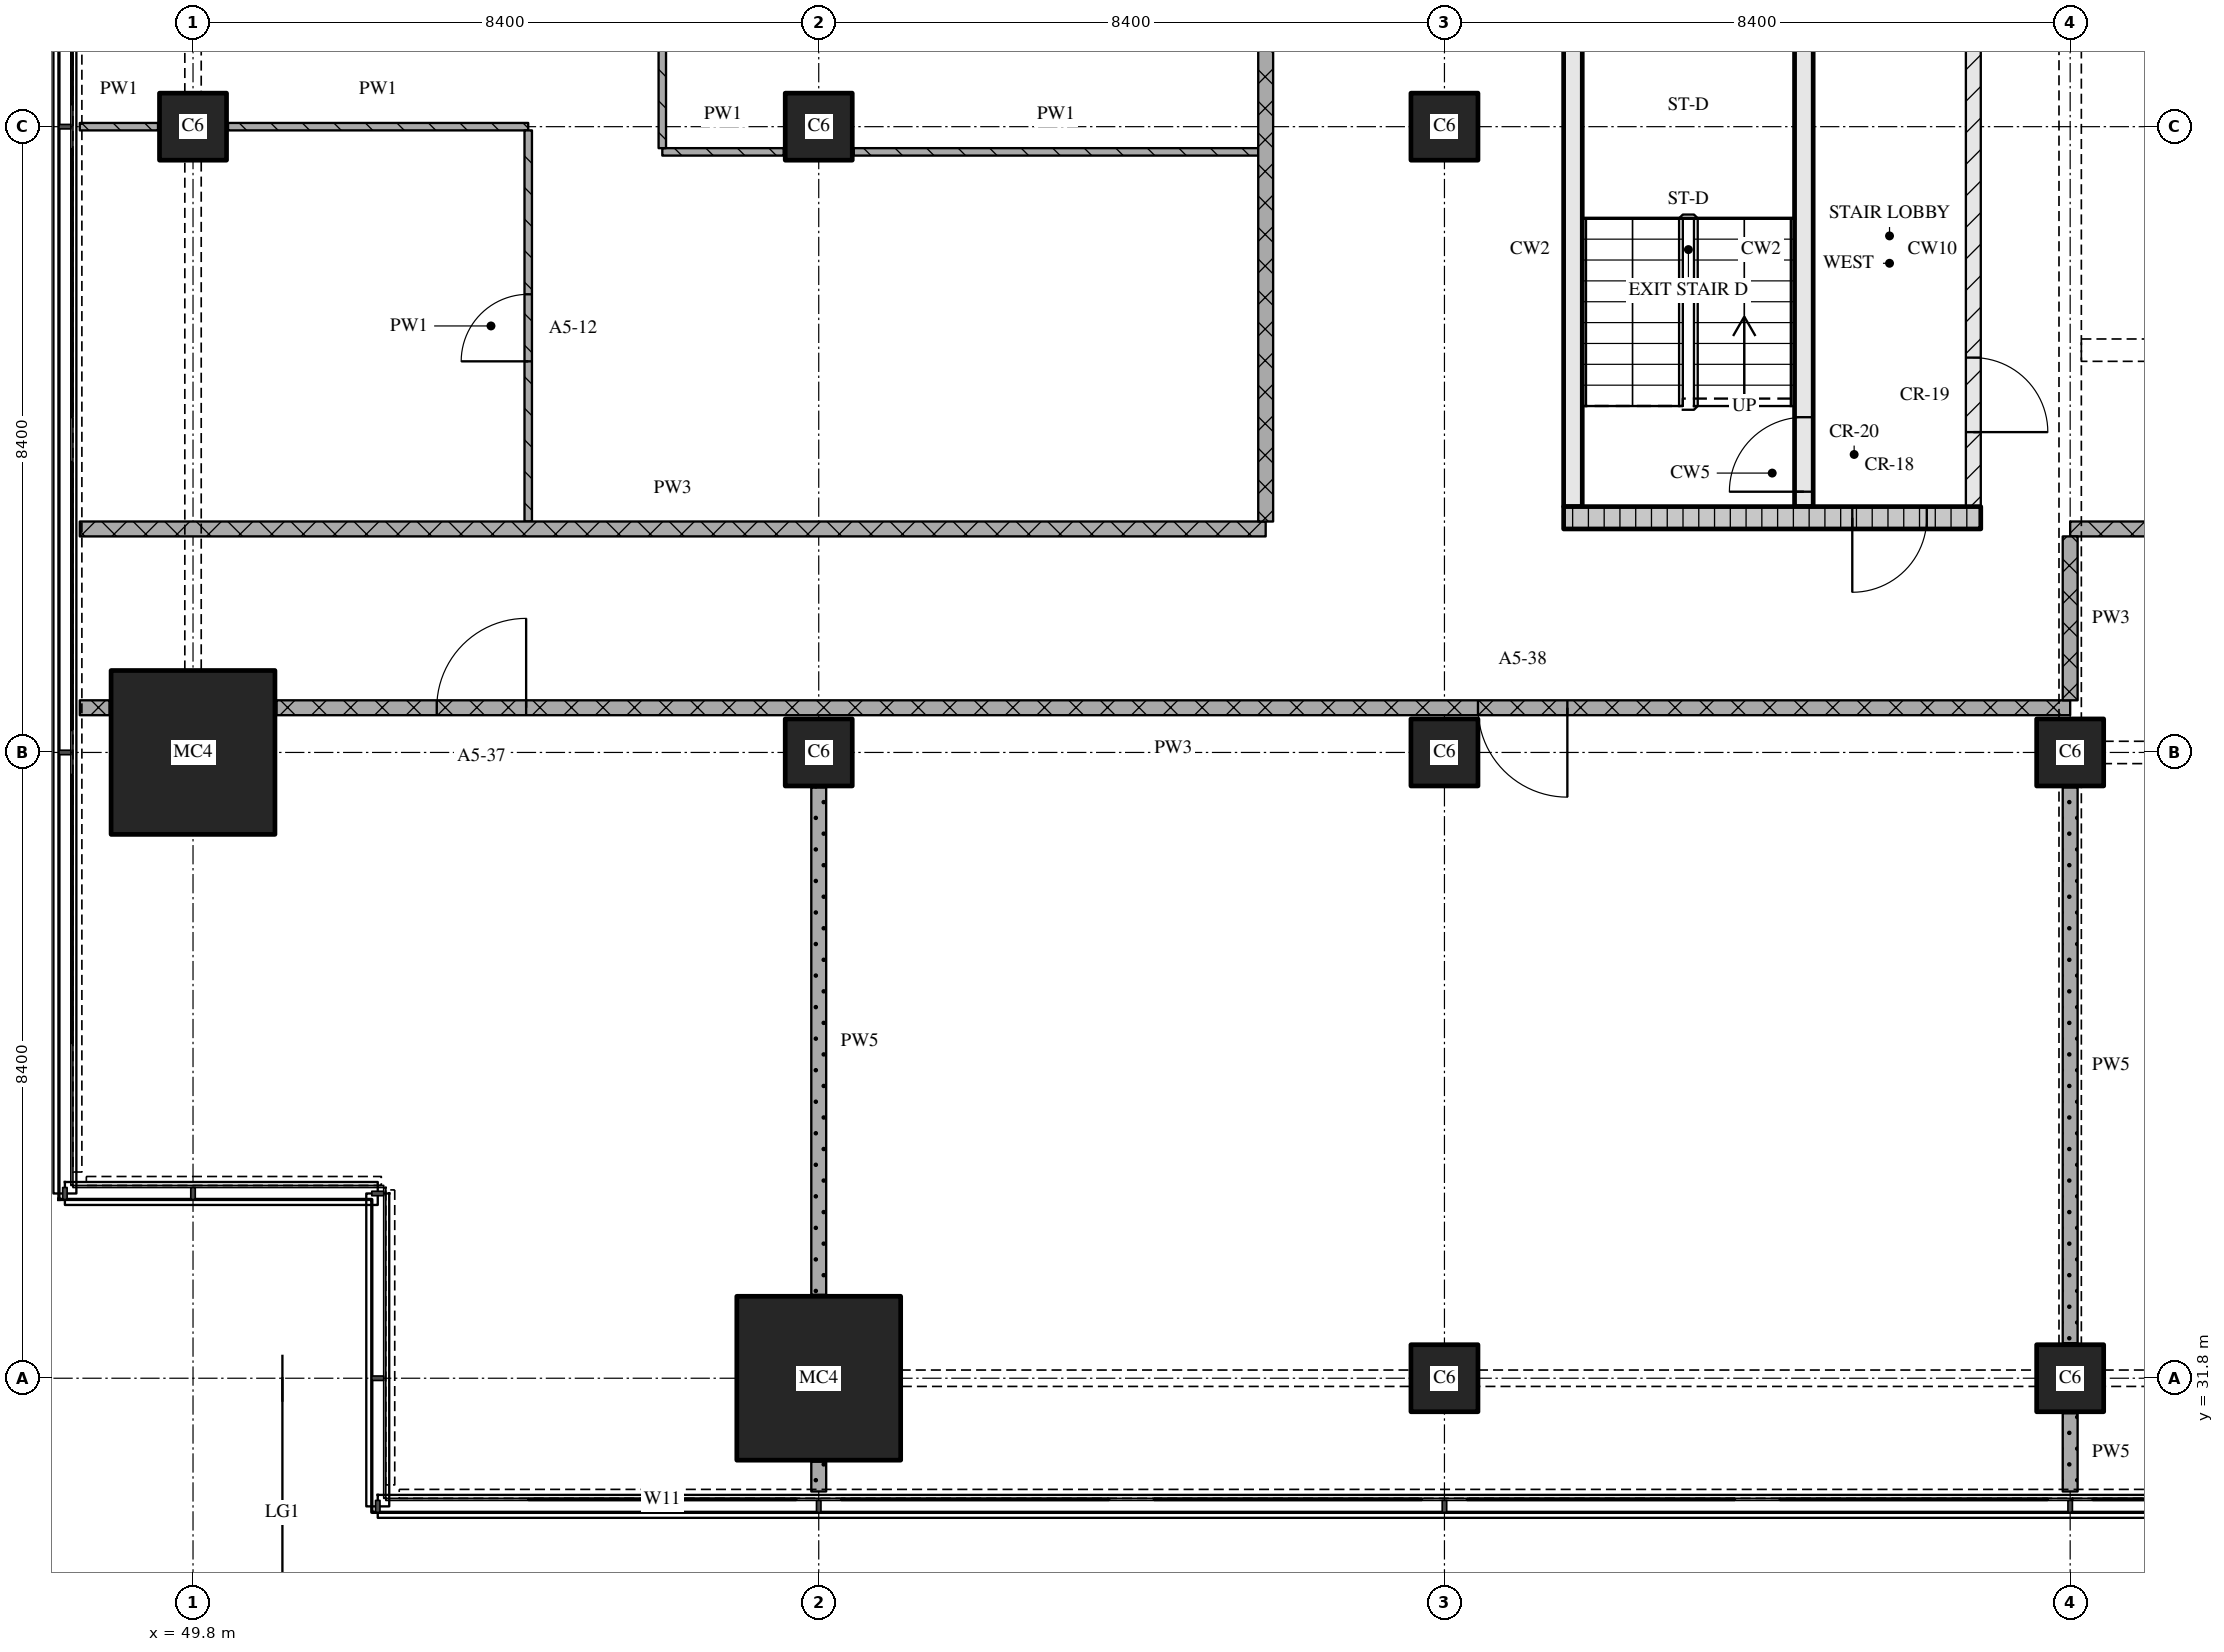
"""IFC4 building model, lengths in metres.
Left out: names, types, materials, properties, quantities, classifications, styles, units other than length and angle.
Written with IfcOpenShell. Run it as: python <this file> out.ifc"""

import sys

from ifc_helpers import new_model, si_unit, direction, frame, frame_2d, origin, origin_2d, place, context, subcontext, project, spatial, rectangle, extrude, element, fill, save


model = new_model("IFC4")
c1 = context("Model", 3, precision=1e-05, world=origin(), true_north=direction((0.0, 1.0)))
c2 = subcontext(c1, "Body", "Model", "MODEL_VIEW")
j1 = project(units=[si_unit("LENGTHUNIT", "METRE"), si_unit("PLANEANGLEUNIT", "RADIAN")], contexts=[c1])
p1 = place(None, origin())
s1 = spatial("IfcSite", under=j1, at=p1, CompositionType="ELEMENT")
p2 = place(p1, origin())
s2 = spatial("IfcBuilding", under=s1, at=p2, CompositionType="ELEMENT")
p3 = place(p2, frame((0.0, 0.0, 80.4)))
s3 = spatial("IfcBuildingStorey", under=s2, at=p3, CompositionType="ELEMENT", Elevation=80.4)
p4 = place(p3, frame((49.8, 40.2, 0.0), z_axis=(0.0, 0.0, 1.0), x_axis=(1.0, 0.0, 0.0)))
e1 = element("IfcColumn", 1, at=p4, inside=s3, PredefinedType="COLUMN", context=c2, shape_type="SweptSolid", body=[
    extrude(rectangle(XDim=2.2, YDim=2.2, at=origin_2d()), origin(), (0.0, 0.0, 1.0), 3.6),
])
p5 = place(p3, frame((49.8, 48.6, 0.0), z_axis=(0.0, 0.0, 1.0), x_axis=(1.0, 0.0, 0.0)))
e2 = element("IfcColumn", 2, at=p5, inside=s3, PredefinedType="COLUMN", context=c2, shape_type="SweptSolid", body=[
    extrude(rectangle(XDim=0.9, YDim=0.9, at=origin_2d()), origin(), (0.0, 0.0, 1.0), 3.6),
])
p6 = place(p3, frame((58.2, 31.8, 0.0), z_axis=(0.0, 0.0, 1.0), x_axis=(1.0, 0.0, 0.0)))
e3 = element("IfcColumn", 3, at=p6, inside=s3, PredefinedType="COLUMN", context=c2, shape_type="SweptSolid", body=[
    extrude(rectangle(XDim=2.2, YDim=2.2, at=origin_2d()), origin(), (0.0, 0.0, 1.0), 3.6),
])
for number, where, z_axis, x_axis in (
    (4, (58.2, 40.2, 0.0), (0.0, 0.0, 1.0), (1.0, 0.0, 0.0)),
    (5, (58.2, 48.6, 0.0), (0.0, 0.0, 1.0), (1.0, 0.0, 0.0)),
    (6, (66.6, 31.8, 0.0), (0.0, 0.0, 1.0), (1.0, 0.0, 0.0)),
    (7, (66.6, 40.2, 0.0), (0.0, 0.0, 1.0), (1.0, 0.0, 0.0)),
    (8, (66.6, 48.6, 0.0), (0.0, 0.0, 1.0), (1.0, 0.0, 0.0)),
    (9, (75.0, 31.8, 0.0), (0.0, 0.0, 1.0), (1.0, 0.0, 0.0)),
    (10, (75.0, 40.2, 0.0), (0.0, 0.0, 1.0), (1.0, 0.0, 0.0)),
):
    element("IfcColumn", number, at=place(p3, frame(where, z_axis=z_axis, x_axis=x_axis)), inside=s3, PredefinedType="COLUMN", context=c2, shape_type="SweptSolid", body=[
        extrude(rectangle(XDim=0.9, YDim=0.9, at=origin_2d()), origin(), (0.0, 0.0, 1.0), 3.6),
    ])
p7 = place(p3, frame((68.2, 43.35, 0.0), z_axis=(0.0, 0.0, 1.0), x_axis=(1.0, 0.0, 0.0)))
e11 = element("IfcWall", 11, at=p7, inside=s3, PredefinedType="SOLIDWALL", context=c2, shape_type="SweptSolid", body=[
    extrude(rectangle(XDim=5.6, YDim=0.3, at=frame_2d((2.8, 0.0))), origin(), (0.0, 0.0, 1.0), 3.3),
])
p8 = place(p7, frame((3.875, 0.0, 0.0)))
e12 = element("IfcOpeningElement", 12, at=p8, cuts=e11, PredefinedType="OPENING", context=c2, shape_type="SweptSolid", body=[
    extrude(rectangle(XDim=1.0, YDim=2.1, at=frame_2d((0.5, 1.05))), frame((0.0, 0.16, 0.0), z_axis=(0.0, -1.0, 0.0), x_axis=(1.0, 0.0, 0.0)), (0.0, 0.0, 1.0), 0.32),
])
p9 = place(p3, frame((68.325, 43.5, 0.0), z_axis=(0.0, 0.0, 1.0), x_axis=(0.0, 1.0, 0.0)))
e13 = element("IfcWall", 13, at=p9, inside=s3, PredefinedType="SOLIDWALL", context=c2, shape_type="SweptSolid", body=[
    extrude(rectangle(XDim=6.9, YDim=0.25, at=frame_2d((3.45, 0.0))), origin(), (0.0, 0.0, 1.0), 3.3),
])
p10 = place(p3, frame((71.425, 43.5, 0.0), z_axis=(0.0, 0.0, 1.0), x_axis=(0.0, 1.0, 0.0)))
e14 = element("IfcWall", 14, at=p10, inside=s3, PredefinedType="SOLIDWALL", context=c2, shape_type="SweptSolid", body=[
    extrude(rectangle(XDim=6.9, YDim=0.25, at=frame_2d((3.45, 0.0))), origin(), (0.0, 0.0, 1.0), 3.3),
])
p11 = place(p10, frame((0.2, 0.0, 0.0)))
e15 = element("IfcOpeningElement", 15, at=p11, cuts=e14, PredefinedType="OPENING", context=c2, shape_type="SweptSolid", body=[
    extrude(rectangle(XDim=1.0, YDim=2.1, at=frame_2d((0.5, 1.05))), frame((0.0, 0.135, 0.0), z_axis=(0.0, -1.0, 0.0), x_axis=(1.0, 0.0, 0.0)), (0.0, 0.0, 1.0), 0.27),
])
p12 = place(p3, frame((73.7, 43.5, 0.0), z_axis=(0.0, 0.0, 1.0), x_axis=(0.0, 1.0, 0.0)))
e16 = element("IfcWall", 16, at=p12, inside=s3, PredefinedType="PARTITIONING", context=c2, shape_type="SweptSolid", body=[
    extrude(rectangle(XDim=6.9, YDim=0.2, at=frame_2d((3.45, 0.0))), origin(), (0.0, 0.0, 1.0), 3.3),
])
p13 = place(p12, frame((1.0, 0.0, 0.0)))
e17 = element("IfcOpeningElement", 17, at=p13, cuts=e16, PredefinedType="OPENING", context=c2, shape_type="SweptSolid", body=[
    extrude(rectangle(XDim=1.0, YDim=2.1, at=frame_2d((0.5, 1.05))), frame((0.0, 0.11, 0.0), z_axis=(0.0, -1.0, 0.0), x_axis=(1.0, 0.0, 0.0)), (0.0, 0.0, 1.0), 0.22),
])
p14 = place(p3, frame((48.28, 40.8, 0.0), z_axis=(0.0, 0.0, 1.0), x_axis=(1.0, 0.0, 0.0)))
e18 = element("IfcWall", 18, at=p14, inside=s3, PredefinedType="PARTITIONING", context=c2, shape_type="SweptSolid", body=[
    extrude(rectangle(XDim=0.4, YDim=0.2, at=frame_2d((0.2, 0.0))), origin(), (0.0, 0.0, 1.0), 3.3),
])
p15 = place(p3, frame((75.0, 40.8, 0.0), z_axis=(0.0, 0.0, 1.0), x_axis=(-1.0, 0.0, 0.0)))
e19 = element("IfcWall", 19, at=p15, inside=s3, PredefinedType="PARTITIONING", context=c2, shape_type="SweptSolid", body=[
    extrude(rectangle(XDim=24.08, YDim=0.2, at=frame_2d((12.04, 0.0))), origin(), (0.0, 0.0, 1.0), 3.3),
])
p16 = place(p15, frame((6.75, 0.0, 0.0)))
e20 = element("IfcOpeningElement", 20, at=p16, cuts=e19, PredefinedType="OPENING", context=c2, shape_type="SweptSolid", body=[
    extrude(rectangle(XDim=1.2, YDim=2.1, at=frame_2d((0.6, 1.05))), frame((0.0, 0.11, 0.0), z_axis=(0.0, -1.0, 0.0), x_axis=(1.0, 0.0, 0.0)), (0.0, 0.0, 1.0), 0.22),
])
p17 = place(p15, frame((20.728, 0.0, 0.0)))
e21 = element("IfcOpeningElement", 21, at=p17, cuts=e19, PredefinedType="OPENING", context=c2, shape_type="SweptSolid", body=[
    extrude(rectangle(XDim=1.2, YDim=2.1, at=frame_2d((0.6, 1.05))), frame((0.0, 0.11, 0.0), z_axis=(0.0, -1.0, 0.0), x_axis=(1.0, 0.0, 0.0)), (0.0, 0.0, 1.0), 0.22),
])
p18 = place(p3, frame((48.28, 43.2, 0.0), z_axis=(0.0, 0.0, 1.0), x_axis=(1.0, 0.0, 0.0)))
e22 = element("IfcWall", 22, at=p18, inside=s3, PredefinedType="PARTITIONING", context=c2, shape_type="SweptSolid", body=[
    extrude(rectangle(XDim=15.92, YDim=0.2, at=frame_2d((7.96, 0.0))), origin(), (0.0, 0.0, 1.0), 3.3),
])
p19 = place(p3, frame((100.2, 43.2, 0.0), z_axis=(0.0, 0.0, 1.0), x_axis=(-1.0, 0.0, 0.0)))
e23 = element("IfcWall", 23, at=p19, inside=s3, PredefinedType="PARTITIONING", context=c2, shape_type="SweptSolid", body=[
    extrude(rectangle(XDim=25.2, YDim=0.2, at=frame_2d((12.6, 0.0))), origin(), (0.0, 0.0, 1.0), 3.3),
])
p20 = place(p19, frame((7.8, 0.0, 0.0)))
e24 = element("IfcOpeningElement", 24, at=p20, cuts=e23, PredefinedType="OPENING", context=c2, shape_type="SweptSolid", body=[
    extrude(rectangle(XDim=1.2, YDim=2.1, at=frame_2d((0.6, 1.05))), frame((0.0, 0.11, 0.0), z_axis=(0.0, -1.0, 0.0), x_axis=(1.0, 0.0, 0.0)), (0.0, 0.0, 1.0), 0.22),
])
p21 = place(p19, frame((20.4, 0.0, 0.0)))
e25 = element("IfcOpeningElement", 25, at=p21, cuts=e23, PredefinedType="OPENING", context=c2, shape_type="SweptSolid", body=[
    extrude(rectangle(XDim=1.2, YDim=2.1, at=frame_2d((0.6, 1.05))), frame((0.0, 0.11, 0.0), z_axis=(0.0, -1.0, 0.0), x_axis=(1.0, 0.0, 0.0)), (0.0, 0.0, 1.0), 0.22),
])
p22 = place(p3, frame((56.1, 48.262, 0.0), z_axis=(0.0, 0.0, 1.0), x_axis=(1.0, 0.0, 0.0)))
e26 = element("IfcWall", 26, at=p22, inside=s3, PredefinedType="PARTITIONING", context=c2, shape_type="SweptSolid", body=[
    extrude(rectangle(XDim=1.63, YDim=0.1, at=frame_2d((0.815, 0.0))), origin(), (0.0, 0.0, 1.0), 3.3),
])
p23 = place(p3, frame((58.67, 48.262, 0.0), z_axis=(0.0, 0.0, 1.0), x_axis=(1.0, 0.0, 0.0)))
e27 = element("IfcWall", 27, at=p23, inside=s3, PredefinedType="PARTITIONING", context=c2, shape_type="SweptSolid", body=[
    extrude(rectangle(XDim=5.43, YDim=0.1, at=frame_2d((2.715, 0.0))), origin(), (0.0, 0.0, 1.0), 3.3),
])
p24 = place(p3, frame((48.28, 48.6, 0.0), z_axis=(0.0, 0.0, 1.0), x_axis=(1.0, 0.0, 0.0)))
e28 = element("IfcWall", 28, at=p24, inside=s3, PredefinedType="PARTITIONING", context=c2, shape_type="SweptSolid", body=[
    extrude(rectangle(XDim=1.05, YDim=0.1, at=frame_2d((0.525, 0.0))), origin(), (0.0, 0.0, 1.0), 3.3),
])
p25 = place(p3, frame((50.27, 48.6, 0.0), z_axis=(0.0, 0.0, 1.0), x_axis=(1.0, 0.0, 0.0)))
e29 = element("IfcWall", 29, at=p25, inside=s3, PredefinedType="PARTITIONING", context=c2, shape_type="SweptSolid", body=[
    extrude(rectangle(XDim=4.03, YDim=0.1, at=frame_2d((2.015, 0.0))), origin(), (0.0, 0.0, 1.0), 3.3),
])
p26 = place(p3, frame((54.3, 43.3, 0.0), z_axis=(0.0, 0.0, 1.0), x_axis=(0.0, 1.0, 0.0)))
e30 = element("IfcWall", 30, at=p26, inside=s3, PredefinedType="PARTITIONING", context=c2, shape_type="SweptSolid", body=[
    extrude(rectangle(XDim=5.25, YDim=0.1, at=frame_2d((2.625, 0.0))), origin(), (0.0, 0.0, 1.0), 3.3),
])
p27 = place(p26, frame((2.15, 0.0, 0.0)))
e31 = element("IfcOpeningElement", 31, at=p27, cuts=e30, PredefinedType="OPENING", context=c2, shape_type="SweptSolid", body=[
    extrude(rectangle(XDim=0.9, YDim=2.1, at=frame_2d((0.45, 1.05))), frame((0.0, 0.06, 0.0), z_axis=(0.0, -1.0, 0.0), x_axis=(1.0, 0.0, 0.0)), (0.0, 0.0, 1.0), 0.12),
])
p28 = place(p3, frame((56.1, 55.45, 0.0), z_axis=(0.0, 0.0, 1.0), x_axis=(0.0, -1.0, 0.0)))
e32 = element("IfcWall", 32, at=p28, inside=s3, PredefinedType="PARTITIONING", context=c2, shape_type="SweptSolid", body=[
    extrude(rectangle(XDim=7.138, YDim=0.1, at=frame_2d((3.569, 0.0))), origin(), (0.0, 0.0, 1.0), 3.3),
])
p29 = place(p3, frame((58.2, 30.68, 0.0), z_axis=(0.0, 0.0, 1.0), x_axis=(0.0, -1.0, 0.0)))
e33 = element("IfcWall", 33, at=p29, inside=s3, PredefinedType="PARTITIONING", context=c2, shape_type="SweptSolid", body=[
    extrude(rectangle(XDim=0.4, YDim=0.2, at=frame_2d((0.2, 0.0))), origin(), (0.0, 0.0, 1.0), 3.3),
])
p30 = place(p3, frame((58.2, 39.73, 0.0), z_axis=(0.0, 0.0, 1.0), x_axis=(0.0, -1.0, 0.0)))
e34 = element("IfcWall", 34, at=p30, inside=s3, PredefinedType="PARTITIONING", context=c2, shape_type="SweptSolid", body=[
    extrude(rectangle(XDim=6.81, YDim=0.2, at=frame_2d((3.405, 0.0))), origin(), (0.0, 0.0, 1.0), 3.3),
])
p31 = place(p3, frame((64.2, 43.3, 0.0), z_axis=(0.0, 0.0, 1.0), x_axis=(0.0, 1.0, 0.0)))
e35 = element("IfcWall", 35, at=p31, inside=s3, PredefinedType="PARTITIONING", context=c2, shape_type="SweptSolid", body=[
    extrude(rectangle(XDim=32.02, YDim=0.2, at=frame_2d((16.01, 0.0))), origin(), (0.0, 0.0, 1.0), 3.3),
])
p32 = place(p31, frame((12.45, 0.0, 0.0)))
e36 = element("IfcOpeningElement", 36, at=p32, cuts=e35, PredefinedType="OPENING", context=c2, shape_type="SweptSolid", body=[
    extrude(rectangle(XDim=1.0, YDim=2.1, at=frame_2d((0.5, 1.05))), frame((0.0, 0.11, 0.0), z_axis=(0.0, -1.0, 0.0), x_axis=(1.0, 0.0, 0.0)), (0.0, 0.0, 1.0), 0.22),
])
p33 = place(p31, frame((26.85, 0.0, 0.0)))
e37 = element("IfcOpeningElement", 37, at=p33, cuts=e35, PredefinedType="OPENING", context=c2, shape_type="SweptSolid", body=[
    extrude(rectangle(XDim=1.0, YDim=2.1, at=frame_2d((0.5, 1.05))), frame((0.0, 0.11, 0.0), z_axis=(0.0, -1.0, 0.0), x_axis=(1.0, 0.0, 0.0)), (0.0, 0.0, 1.0), 0.22),
])
p34 = place(p3, frame((75.0, 43.1, 0.0), z_axis=(0.0, 0.0, 1.0), x_axis=(0.0, -1.0, 0.0)))
e38 = element("IfcWall", 38, at=p34, inside=s3, PredefinedType="PARTITIONING", context=c2, shape_type="SweptSolid", body=[
    extrude(rectangle(XDim=2.2, YDim=0.2, at=frame_2d((1.1, 0.0))), origin(), (0.0, 0.0, 1.0), 2.41),
])
p35 = place(p3, frame((75.0, 31.33, 0.0), z_axis=(0.0, 0.0, 1.0), x_axis=(0.0, -1.0, 0.0)))
e39 = element("IfcWall", 39, at=p35, inside=s3, PredefinedType="PARTITIONING", context=c2, shape_type="SweptSolid", body=[
    extrude(rectangle(XDim=1.05, YDim=0.2, at=frame_2d((0.525, 0.0))), origin(), (0.0, 0.0, 1.0), 2.41),
])
p36 = place(p3, frame((75.0, 39.73, 0.0), z_axis=(0.0, 0.0, 1.0), x_axis=(0.0, -1.0, 0.0)))
e40 = element("IfcWall", 40, at=p36, inside=s3, PredefinedType="PARTITIONING", context=c2, shape_type="SweptSolid", body=[
    extrude(rectangle(XDim=7.46, YDim=0.2, at=frame_2d((3.73, 0.0))), origin(), (0.0, 0.0, 1.0), 2.81),
])
p37 = place(p8, origin())
e41 = element("IfcDoor", 41, at=p37, inside=s3, OperationType="SINGLE_SWING_RIGHT", PredefinedType="DOOR", context=c2, shape_type="SweptSolid", body=[
    extrude(rectangle(XDim=1.0, YDim=2.1, at=frame_2d((0.5, 1.05))), frame((0.0, 0.025, 0.0), z_axis=(0.0, -1.0, 0.0), x_axis=(1.0, 0.0, 0.0)), (0.0, 0.0, 1.0), 0.05),
])
fill(e12, e41)
p38 = place(p11, origin())
e42 = element("IfcDoor", 42, at=p38, inside=s3, OperationType="SINGLE_SWING_LEFT", PredefinedType="DOOR", context=c2, shape_type="SweptSolid", body=[
    extrude(rectangle(XDim=1.0, YDim=2.1, at=frame_2d((0.5, 1.05))), frame((0.0, 0.025, 0.0), z_axis=(0.0, -1.0, 0.0), x_axis=(1.0, 0.0, 0.0)), (0.0, 0.0, 1.0), 0.05),
])
fill(e15, e42)
p39 = place(p13, origin())
e43 = element("IfcDoor", 43, at=p39, inside=s3, OperationType="SINGLE_SWING_RIGHT", PredefinedType="DOOR", context=c2, shape_type="SweptSolid", body=[
    extrude(rectangle(XDim=1.0, YDim=2.1, at=frame_2d((0.5, 1.05))), frame((0.0, 0.025, 0.0), z_axis=(0.0, -1.0, 0.0), x_axis=(1.0, 0.0, 0.0)), (0.0, 0.0, 1.0), 0.05),
])
fill(e17, e43)
p40 = place(p16, origin())
e44 = element("IfcDoor", 44, at=p40, inside=s3, OperationType="SINGLE_SWING_LEFT", PredefinedType="DOOR", context=c2, shape_type="SweptSolid", body=[
    extrude(rectangle(XDim=1.2, YDim=2.1, at=frame_2d((0.6, 1.05))), frame((0.0, 0.025, 0.0), z_axis=(0.0, -1.0, 0.0), x_axis=(1.0, 0.0, 0.0)), (0.0, 0.0, 1.0), 0.05),
])
fill(e20, e44)
p41 = place(p17, origin())
e45 = element("IfcDoor", 45, at=p41, inside=s3, OperationType="SINGLE_SWING_RIGHT", PredefinedType="DOOR", context=c2, shape_type="SweptSolid", body=[
    extrude(rectangle(XDim=1.2, YDim=2.1, at=frame_2d((0.6, 1.05))), frame((0.0, 0.025, 0.0), z_axis=(0.0, -1.0, 0.0), x_axis=(1.0, 0.0, 0.0)), (0.0, 0.0, 1.0), 0.05),
])
fill(e21, e45)
p42 = place(p27, origin())
e46 = element("IfcDoor", 46, at=p42, inside=s3, OperationType="SINGLE_SWING_LEFT", PredefinedType="DOOR", context=c2, shape_type="SweptSolid", body=[
    extrude(rectangle(XDim=0.9, YDim=2.1, at=frame_2d((0.45, 1.05))), frame((0.0, 0.025, 0.0), z_axis=(0.0, -1.0, 0.0), x_axis=(1.0, 0.0, 0.0)), (0.0, 0.0, 1.0), 0.05),
])
fill(e31, e46)
save(model, sys.argv[1])
